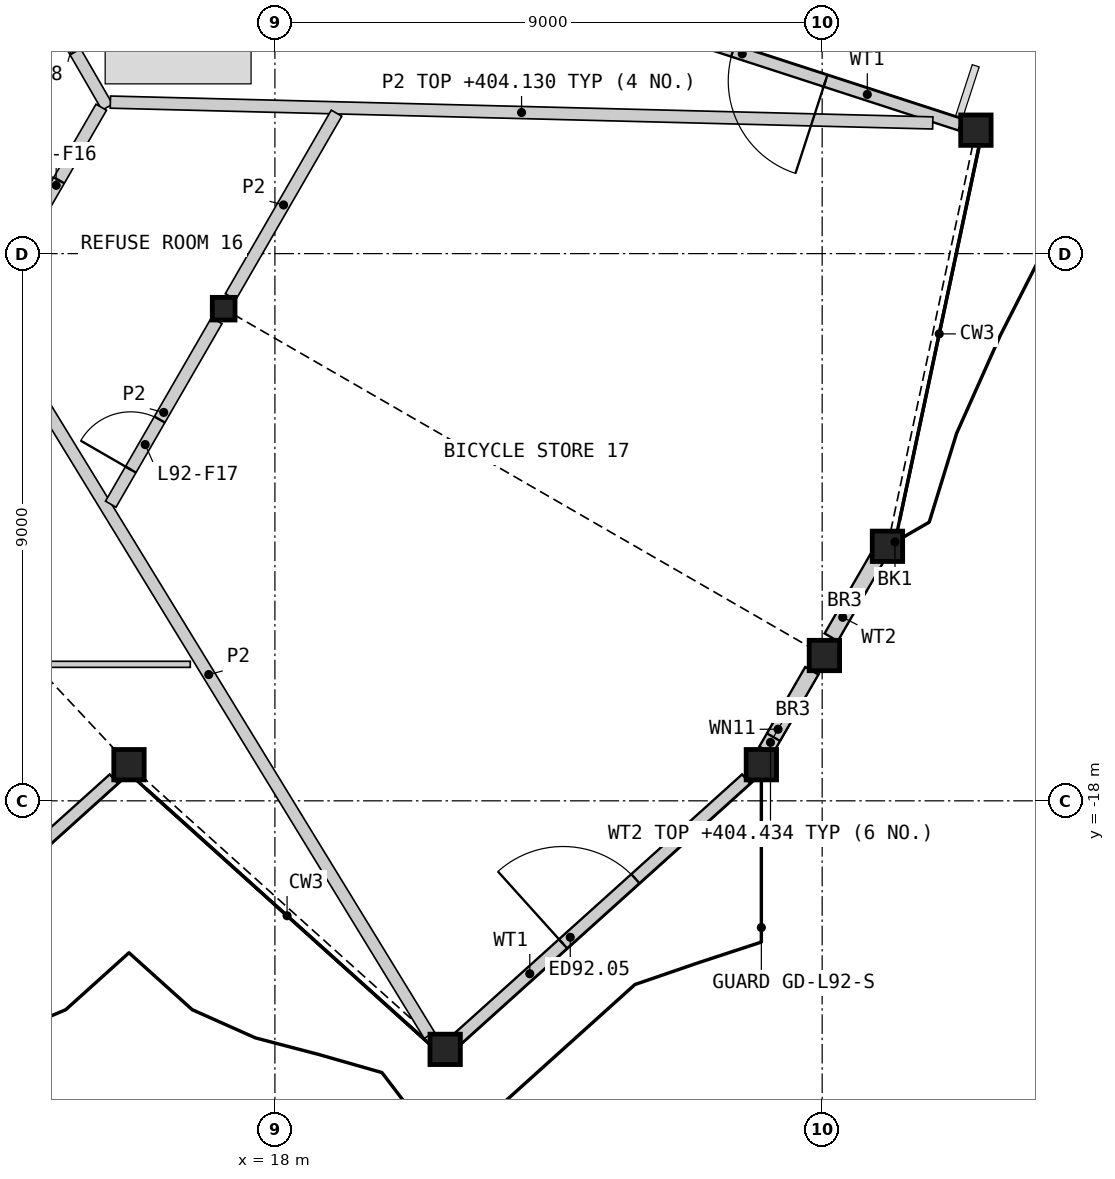
"""IFC4 building model, lengths in metres.
Left out: names, types, materials, properties, quantities, classifications, styles, units other than length and angle.
Written with IfcOpenShell. Run it as: python <this file> out.ifc"""

import sys

from ifc_helpers import new_model, si_unit, direction, frame, frame_2d, origin, origin_2d, place, context, subcontext, project, spatial, rectangle, hollow_rectangle, i_section, extrude, element, fill, save


model = new_model("IFC4")
c1 = context("Model", 3, precision=1e-05, world=origin(), true_north=direction((0.0, 1.0)))
c2 = subcontext(c1, "Body", "Model", "MODEL_VIEW")
j1 = project(units=[si_unit("LENGTHUNIT", "METRE"), si_unit("PLANEANGLEUNIT", "RADIAN")], contexts=[c1])
p1 = place(None, origin())
s1 = spatial("IfcSite", under=j1, at=p1, CompositionType="ELEMENT")
p2 = place(p1, origin())
s2 = spatial("IfcBuilding", under=s1, at=p2, CompositionType="ELEMENT")
p3 = place(p2, frame((0.0, 0.0, 401.8)))
s3 = spatial("IfcBuildingStorey", under=s2, at=p3, CompositionType="ELEMENT", Elevation=401.8)
for number, where, z_axis, x_axis in (
    (1, (15.6, -17.406, 0.0), (0.0, 0.0, 1.0), (1.0, 0.0, 0.0)),
    (2, (20.8, -22.088, 0.0), (0.0, 0.0, 1.0), (1.0, 0.0, 0.0)),
    (3, (26.0, -17.406, 0.0), (0.0, 0.0, 1.0), (1.0, 0.0, 0.0)),
    (4, (27.037, -15.61, 0.0), (0.0, 0.0, 1.0), (1.0, 0.0, 0.0)),
    (5, (28.074, -13.814, 0.0), (0.0, 0.0, 1.0), (1.0, 0.0, 0.0)),
    (6, (29.529, -6.969, 0.0), (0.0, 0.0, 1.0), (1.0, 0.0, 0.0)),
):
    element("IfcColumn", number, at=place(p3, frame(where, z_axis=z_axis, x_axis=x_axis)), inside=s3, PredefinedType="COLUMN", context=c2, shape_type="SweptSolid", body=[
        extrude(hollow_rectangle(XDim=0.5, YDim=0.5, WallThickness=0.03, at=origin_2d()), origin(), (0.0, 0.0, 1.0), 3.4),
    ])
p4 = place(p3, frame((17.157, -9.906, 0.0), z_axis=(0.0, 0.0, 1.0), x_axis=(1.0, 0.0, 0.0)))
e7 = element("IfcColumn", 7, at=p4, inside=s3, PredefinedType="COLUMN", context=c2, shape_type="SweptSolid", body=[
    extrude(i_section(OverallWidth=0.374, OverallDepth=0.372, WebThickness=0.016, FlangeThickness=0.026, at=origin_2d()), origin(), (0.0, 0.0, 1.0), 3.4),
])
p5 = place(p3, frame((10.605, -21.912, 0.0), z_axis=(0.0, 0.0, 1.0), x_axis=(0.743149635876, 0.669125263831, 0.0)))
e8 = element("IfcWall", 8, at=p5, inside=s3, PredefinedType="SOLIDWALL", context=c2, shape_type="SweptSolid", body=[
    extrude(rectangle(XDim=6.385, YDim=0.2, at=frame_2d((3.193, 0.0))), origin(), (0.0, 0.0, 1.0), 2.634),
])
p6 = place(p5, frame((2.333, 0.0, 0.0)))
e9 = element("IfcOpeningElement", 9, at=p6, cuts=e8, PredefinedType="OPENING", context=c2, shape_type="SweptSolid", body=[
    extrude(rectangle(XDim=1.6, YDim=2.25, at=frame_2d((0.8, 1.125))), frame((0.0, 0.11, 0.0), z_axis=(0.0, -1.0, 0.0), x_axis=(1.0, 0.0, 0.0)), (0.0, 0.0, 1.0), 0.22),
])
p7 = place(p3, frame((21.005, -21.912, 0.0), z_axis=(0.0, 0.0, 1.0), x_axis=(0.743132515916, 0.669144277259, 0.0)))
e10 = element("IfcWall", 10, at=p7, inside=s3, PredefinedType="SOLIDWALL", context=c2, shape_type="SweptSolid", body=[
    extrude(rectangle(XDim=6.385, YDim=0.2, at=frame_2d((3.192, 0.0))), origin(), (0.0, 0.0, 1.0), 2.634),
])
p8 = place(p7, frame((2.333, 0.0, 0.0)))
e11 = element("IfcOpeningElement", 11, at=p8, cuts=e10, PredefinedType="OPENING", context=c2, shape_type="SweptSolid", body=[
    extrude(rectangle(XDim=1.6, YDim=2.25, at=frame_2d((0.8, 1.125))), frame((0.0, 0.11, 0.0), z_axis=(0.0, -1.0, 0.0), x_axis=(1.0, 0.0, 0.0)), (0.0, 0.0, 1.0), 0.22),
])
p9 = place(p3, frame((26.075, -17.169, 0.0), z_axis=(0.0, 0.0, 1.0), x_axis=(0.500048779063, 0.865997239347, 0.0)))
e12 = element("IfcWall", 12, at=p9, inside=s3, PredefinedType="SOLIDWALL", context=c2, shape_type="SweptSolid", body=[
    extrude(rectangle(XDim=1.511, YDim=0.25, at=frame_2d((0.755, 0.0))), origin(), (0.0, 0.0, 1.0), 2.634),
])
p10 = place(p9, frame((0.25, 0.0, 1.7)))
e13 = element("IfcOpeningElement", 13, at=p10, cuts=e12, PredefinedType="OPENING", context=c2, shape_type="SweptSolid", body=[
    extrude(rectangle(XDim=0.6, YDim=0.7, at=frame_2d((0.3, 0.35))), frame((0.0, 0.135, 0.0), z_axis=(0.0, -1.0, 0.0), x_axis=(1.0, 0.0, 0.0)), (0.0, 0.0, 1.0), 0.27),
])
p11 = place(p3, frame((27.148, -15.31, 0.0), z_axis=(0.0, 0.0, 1.0), x_axis=(0.499931517724, 0.866064938435, 0.0)))
e14 = element("IfcWall", 14, at=p11, inside=s3, PredefinedType="SOLIDWALL", context=c2, shape_type="SweptSolid", body=[
    extrude(rectangle(XDim=1.516, YDim=0.25, at=frame_2d((0.758, 0.0))), origin(), (0.0, 0.0, 1.0), 2.634),
])
p12 = place(p3, frame((29.274, -6.88, 0.0), z_axis=(0.0, 0.0, 1.0), x_axis=(-0.951055516513, 0.309020071371, 0.0)))
e15 = element("IfcWall", 15, at=p12, inside=s3, PredefinedType="SOLIDWALL", context=c2, shape_type="SweptSolid", body=[
    extrude(rectangle(XDim=6.44, YDim=0.2, at=frame_2d((3.22, 0.0))), origin(), (0.0, 0.0, 1.0), 2.634),
])
p13 = place(p12, frame((2.333, 0.0, 0.0)))
e16 = element("IfcOpeningElement", 16, at=p13, cuts=e15, PredefinedType="OPENING", context=c2, shape_type="SweptSolid", body=[
    extrude(rectangle(XDim=1.6, YDim=2.25, at=frame_2d((0.8, 1.125))), frame((0.0, 0.11, 0.0), z_axis=(0.0, -1.0, 0.0), x_axis=(1.0, 0.0, 0.0)), (0.0, 0.0, 1.0), 0.22),
])
p14 = place(p3, frame((12.981, -2.673, 0.0), z_axis=(0.0, 0.0, 1.0), x_axis=(0.499974648164, -0.866040040179, 0.0)))
e17 = element("IfcWall", 17, at=p14, inside=s3, PredefinedType="PARTITIONING", context=c2, shape_type="SweptSolid", body=[
    extrude(rectangle(XDim=4.525, YDim=0.2, at=frame_2d((2.263, 0.0))), origin(), (0.0, 0.0, 1.0), 3.1),
])
p15 = place(p14, frame((2.468, 0.0, 0.0)))
e18 = element("IfcOpeningElement", 18, at=p15, cuts=e17, PredefinedType="OPENING", context=c2, shape_type="SweptSolid", body=[
    extrude(rectangle(XDim=1.0, YDim=2.1, at=frame_2d((0.5, 1.05))), frame((0.0, 0.11, 0.0), z_axis=(0.0, -1.0, 0.0), x_axis=(1.0, 0.0, 0.0)), (0.0, 0.0, 1.0), 0.22),
])
p16 = place(p3, frame((13.281, -9.819, 0.0), z_axis=(0.0, 0.0, 1.0), x_axis=(0.499958791762, 0.866049194065, 0.0)))
e19 = element("IfcWall", 19, at=p16, inside=s3, PredefinedType="PARTITIONING", context=c2, shape_type="SweptSolid", body=[
    extrude(rectangle(XDim=3.726, YDim=0.2, at=frame_2d((1.863, 0.0))), origin(), (0.0, 0.0, 1.0), 3.1),
])
p17 = place(p16, frame((1.388, 0.0, 0.0)))
e20 = element("IfcOpeningElement", 20, at=p17, cuts=e19, PredefinedType="OPENING", context=c2, shape_type="SweptSolid", body=[
    extrude(rectangle(XDim=0.95, YDim=2.1, at=frame_2d((0.475, 1.05))), frame((0.0, 0.11, 0.0), z_axis=(0.0, -1.0, 0.0), x_axis=(1.0, 0.0, 0.0)), (0.0, 0.0, 1.0), 0.22),
])
p18 = place(p3, frame((15.294, -6.508, 0.0), z_axis=(0.0, 0.0, 1.0), x_axis=(0.999679467074, -0.02531724927, 0.0)))
e21 = element("IfcWall", 21, at=p18, inside=s3, PredefinedType="PARTITIONING", context=c2, shape_type="SweptSolid", body=[
    extrude(rectangle(XDim=13.53, YDim=0.2, at=frame_2d((6.765, 0.0))), origin(), (0.0, 0.0, 1.0), 2.33),
])
p19 = place(p3, frame((13.283, -9.991, 0.0), z_axis=(0.0, 0.0, 1.0), x_axis=(0.521777294246, -0.853081740052, 0.0)))
e22 = element("IfcWall", 22, at=p19, inside=s3, PredefinedType="PARTITIONING", context=c2, shape_type="SweptSolid", body=[
    extrude(rectangle(XDim=13.908, YDim=0.2, at=frame_2d((6.954, 0.0))), origin(), (0.0, 0.0, 1.0), 2.33),
])
p20 = place(p3, frame((15.301, -13.121, 0.0), z_axis=(0.0, 0.0, 1.0), x_axis=(0.499981154543, 0.866036283941, 0.0)))
e23 = element("IfcWall", 23, at=p20, inside=s3, PredefinedType="PARTITIONING", context=c2, shape_type="SweptSolid", body=[
    extrude(rectangle(XDim=3.486, YDim=0.2, at=frame_2d((1.743, 0.0))), origin(), (0.0, 0.0, 1.0), 2.33),
])
p21 = place(p20, frame((0.657, 0.0, 0.0)))
e24 = element("IfcOpeningElement", 24, at=p21, cuts=e23, PredefinedType="OPENING", context=c2, shape_type="SweptSolid", body=[
    extrude(rectangle(XDim=0.95, YDim=2.1, at=frame_2d((0.475, 1.05))), frame((0.0, 0.11, 0.0), z_axis=(0.0, -1.0, 0.0), x_axis=(1.0, 0.0, 0.0)), (0.0, 0.0, 1.0), 0.22),
])
p22 = place(p3, frame((17.271, -9.708, 0.0), z_axis=(0.0, 0.0, 1.0), x_axis=(0.500011485685, 0.866018772419, 0.0)))
e25 = element("IfcWall", 25, at=p22, inside=s3, PredefinedType="PARTITIONING", context=c2, shape_type="SweptSolid", body=[
    extrude(rectangle(XDim=3.485, YDim=0.2, at=frame_2d((1.743, 0.0))), origin(), (0.0, 0.0, 1.0), 2.33),
])
p23 = place(p3, frame((10.45, -15.755, 0.0), z_axis=(0.0, 0.0, 1.0), x_axis=(1.0, 0.0, 0.0)))
e26 = element("IfcWall", 26, at=p23, inside=s3, PredefinedType="PARTITIONING", context=c2, shape_type="SweptSolid", body=[
    extrude(rectangle(XDim=6.158, YDim=0.1, at=frame_2d((3.079, 0.0))), origin(), (0.0, 0.0, 1.0), 2.33),
])
p24 = place(p23, frame((0.851, 0.0, 0.0)))
e27 = element("IfcOpeningElement", 27, at=p24, cuts=e26, PredefinedType="OPENING", context=c2, shape_type="SweptSolid", body=[
    extrude(rectangle(XDim=0.95, YDim=2.1, at=frame_2d((0.475, 1.05))), frame((0.0, 0.06, 0.0), z_axis=(0.0, -1.0, 0.0), x_axis=(1.0, 0.0, 0.0)), (0.0, 0.0, 1.0), 0.12),
])
p25 = place(p8, origin())
e28 = element("IfcDoor", 28, at=p25, inside=s3, OperationType="DOUBLE_DOOR_SINGLE_SWING", PredefinedType="DOOR", context=c2, shape_type="SweptSolid", body=[
    extrude(rectangle(XDim=1.6, YDim=2.25, at=frame_2d((0.8, 1.125))), frame((0.0, 0.025, 0.0), z_axis=(0.0, -1.0, 0.0), x_axis=(1.0, 0.0, 0.0)), (0.0, 0.0, 1.0), 0.05),
])
fill(e11, e28)
p26 = place(p10, origin())
e29 = element("IfcWindow", 29, at=p26, inside=s3, PartitioningType="SINGLE_PANEL", PredefinedType="WINDOW", context=c2, shape_type="SweptSolid", body=[
    extrude(rectangle(XDim=0.6, YDim=0.7, at=frame_2d((0.3, 0.35))), frame((0.0, 0.03, 0.0), z_axis=(0.0, -1.0, 0.0), x_axis=(1.0, 0.0, 0.0)), (0.0, 0.0, 1.0), 0.06),
])
fill(e13, e29)
p27 = place(p13, origin())
e30 = element("IfcDoor", 30, at=p27, inside=s3, OperationType="DOUBLE_DOOR_SINGLE_SWING", PredefinedType="DOOR", context=c2, shape_type="SweptSolid", body=[
    extrude(rectangle(XDim=1.6, YDim=2.25, at=frame_2d((0.8, 1.125))), frame((0.0, 0.025, 0.0), z_axis=(0.0, -1.0, 0.0), x_axis=(1.0, 0.0, 0.0)), (0.0, 0.0, 1.0), 0.05),
])
fill(e16, e30)
p28 = place(p17, origin())
e31 = element("IfcDoor", 31, at=p28, inside=s3, OperationType="SINGLE_SWING_LEFT", PredefinedType="DOOR", context=c2, shape_type="SweptSolid", body=[
    extrude(rectangle(XDim=0.95, YDim=2.1, at=frame_2d((0.475, 1.05))), frame((0.0, 0.025, 0.0), z_axis=(0.0, -1.0, 0.0), x_axis=(1.0, 0.0, 0.0)), (0.0, 0.0, 1.0), 0.05),
])
fill(e20, e31)
p29 = place(p21, origin())
e32 = element("IfcDoor", 32, at=p29, inside=s3, OperationType="SINGLE_SWING_LEFT", PredefinedType="DOOR", context=c2, shape_type="SweptSolid", body=[
    extrude(rectangle(XDim=0.95, YDim=2.1, at=frame_2d((0.475, 1.05))), frame((0.0, 0.025, 0.0), z_axis=(0.0, -1.0, 0.0), x_axis=(1.0, 0.0, 0.0)), (0.0, 0.0, 1.0), 0.05),
])
fill(e24, e32)
p30 = place(p15, origin())
e33 = element("IfcDoor", 33, at=p30, inside=s3, OperationType="SINGLE_SWING_LEFT", PredefinedType="DOOR", context=c2, shape_type="SweptSolid", body=[
    extrude(rectangle(XDim=1.0, YDim=2.1, at=frame_2d((0.5, 1.05))), frame((0.0, 0.025, 0.0), z_axis=(0.0, -1.0, 0.0), x_axis=(1.0, 0.0, 0.0)), (0.0, 0.0, 1.0), 0.05),
])
fill(e18, e33)
save(model, sys.argv[1])
